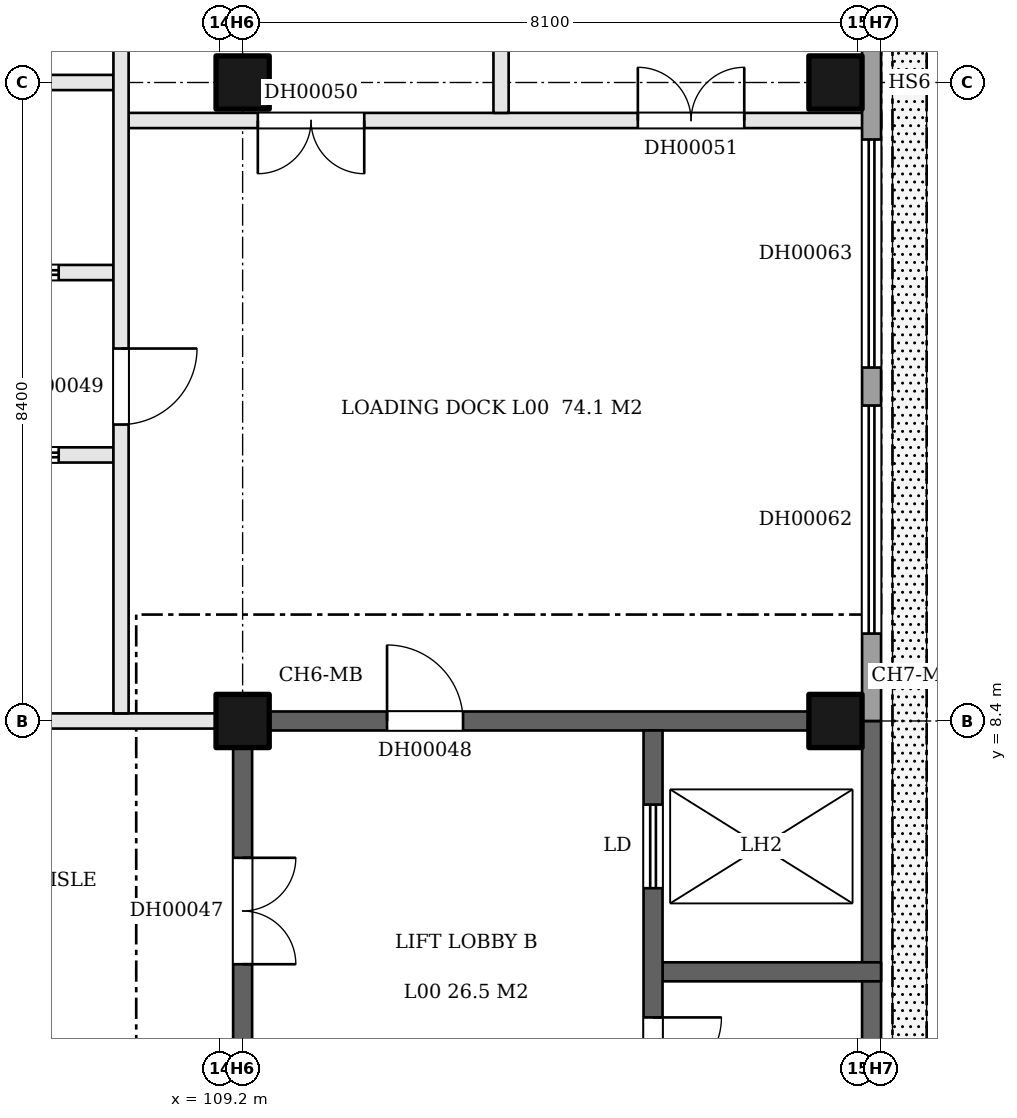
"""IFC4 building model, lengths in metres.
Left out: names, types, materials, properties, quantities, classifications, styles, units other than length and angle.
Written with IfcOpenShell. Run it as: python <this file> out.ifc"""

import sys

from ifc_helpers import new_model, si_unit, direction, frame, frame_2d, origin, origin_2d, place, context, subcontext, project, spatial, rectangle, extrude, element, fill, save


model = new_model("IFC4")
c1 = context("Model", 3, precision=1e-05, world=origin(), true_north=direction((0.0, 1.0)))
c2 = subcontext(c1, "Body", "Model", "MODEL_VIEW")
j1 = project(units=[si_unit("LENGTHUNIT", "METRE"), si_unit("PLANEANGLEUNIT", "RADIAN")], contexts=[c1])
p1 = place(None, origin())
s1 = spatial("IfcSite", under=j1, at=p1, CompositionType="ELEMENT")
p2 = place(p1, origin())
s2 = spatial("IfcBuilding", under=s1, at=p2, CompositionType="ELEMENT")
p3 = place(p2, origin())
s3 = spatial("IfcBuildingStorey", under=s2, at=p3, CompositionType="ELEMENT", Elevation=0.0)
p4 = place(p3, frame((109.5, 8.4, 0.0), z_axis=(0.0, 0.0, 1.0), x_axis=(1.0, 0.0, 0.0)))
e1 = element("IfcColumn", 1, at=p4, inside=s3, PredefinedType="COLUMN", context=c2, shape_type="SweptSolid", body=[
    extrude(rectangle(XDim=0.7, YDim=0.7, at=origin_2d()), origin(), (0.0, 0.0, 1.0), 8.7),
])
p5 = place(p3, frame((109.5, 16.8, -0.2), z_axis=(0.0, 0.0, 1.0), x_axis=(1.0, 0.0, 0.0)))
e2 = element("IfcColumn", 2, at=p5, inside=s3, PredefinedType="COLUMN", context=c2, shape_type="SweptSolid", body=[
    extrude(rectangle(XDim=0.7, YDim=0.7, at=origin_2d()), origin(), (0.0, 0.0, 1.0), 8.9),
])
p6 = place(p3, frame((117.3, 8.4, 0.0), z_axis=(0.0, 0.0, 1.0), x_axis=(1.0, 0.0, 0.0)))
e3 = element("IfcColumn", 3, at=p6, inside=s3, PredefinedType="COLUMN", context=c2, shape_type="SweptSolid", body=[
    extrude(rectangle(XDim=0.7, YDim=0.7, at=origin_2d()), origin(), (0.0, 0.0, 1.0), 8.7),
])
p7 = place(p3, frame((117.3, 16.8, -0.2), z_axis=(0.0, 0.0, 1.0), x_axis=(1.0, 0.0, 0.0)))
e4 = element("IfcColumn", 4, at=p7, inside=s3, PredefinedType="COLUMN", context=c2, shape_type="SweptSolid", body=[
    extrude(rectangle(XDim=0.7, YDim=0.7, at=origin_2d()), origin(), (0.0, 0.0, 1.0), 8.9),
])
p8 = place(p3, frame((115.025, 5.1, 0.0), z_axis=(0.0, 0.0, 1.0), x_axis=(1.0, 0.0, 0.0)))
e5 = element("IfcWall", 5, at=p8, inside=s3, PredefinedType="SHEAR", context=c2, shape_type="SweptSolid", body=[
    extrude(rectangle(XDim=2.875, YDim=0.25, at=frame_2d((1.438, 0.0))), origin(), (0.0, 0.0, 1.0), 8.7),
])
p9 = place(p3, frame((101.45, 8.4, 0.0), z_axis=(0.0, 0.0, 1.0), x_axis=(1.0, 0.0, 0.0)))
e6 = element("IfcWall", 6, at=p9, inside=s3, PredefinedType="PARTITIONING", context=c2, shape_type="SweptSolid", body=[
    extrude(rectangle(XDim=7.7, YDim=0.2, at=frame_2d((3.85, 0.0))), origin(), (0.0, 0.0, 1.0), 8.7),
])
p10 = place(p3, frame((109.85, 8.4, 0.0), z_axis=(0.0, 0.0, 1.0), x_axis=(1.0, 0.0, 0.0)))
e7 = element("IfcWall", 7, at=p10, inside=s3, PredefinedType="SHEAR", context=c2, shape_type="SweptSolid", body=[
    extrude(rectangle(XDim=7.1, YDim=0.25, at=frame_2d((3.55, 0.0))), origin(), (0.0, 0.0, 1.0), 8.7),
])
p11 = place(p10, frame((1.55, 0.0, 0.0)))
e8 = element("IfcOpeningElement", 8, at=p11, cuts=e7, PredefinedType="OPENING", context=c2, shape_type="SweptSolid", body=[
    extrude(rectangle(XDim=1.0, YDim=2.1, at=frame_2d((0.5, 1.05))), frame((0.0, 0.135, 0.0), z_axis=(0.0, -1.0, 0.0), x_axis=(1.0, 0.0, 0.0)), (0.0, 0.0, 1.0), 0.27),
])
p12 = place(p3, frame((68.35, 11.9, 0.0), z_axis=(0.0, 0.0, 1.0), x_axis=(1.0, 0.0, 0.0)))
e9 = element("IfcWall", 9, at=p12, inside=s3, PredefinedType="PARTITIONING", context=c2, shape_type="SweptSolid", body=[
    extrude(rectangle(XDim=39.45, YDim=0.2, at=frame_2d((19.725, 0.0))), origin(), (0.0, 0.0, 1.0), 8.7),
])
p13 = place(p12, frame((0.2, 0.0, 0.0)))
e10 = element("IfcOpeningElement", 10, at=p13, cuts=e9, PredefinedType="OPENING", context=c2, shape_type="SweptSolid", body=[
    extrude(rectangle(XDim=2.4, YDim=2.4, at=frame_2d((1.2, 1.2))), frame((0.0, 0.11, 0.0), z_axis=(0.0, -1.0, 0.0), x_axis=(1.0, 0.0, 0.0)), (0.0, 0.0, 1.0), 0.22),
])
p14 = place(p12, frame((4.01, 0.0, 0.0)))
e11 = element("IfcOpeningElement", 11, at=p14, cuts=e9, PredefinedType="OPENING", context=c2, shape_type="SweptSolid", body=[
    extrude(rectangle(XDim=2.4, YDim=2.4, at=frame_2d((1.2, 1.2))), frame((0.0, 0.11, 0.0), z_axis=(0.0, -1.0, 0.0), x_axis=(1.0, 0.0, 0.0)), (0.0, 0.0, 1.0), 0.22),
])
p15 = place(p12, frame((8.05, 0.0, 0.0)))
e12 = element("IfcOpeningElement", 12, at=p15, cuts=e9, PredefinedType="OPENING", context=c2, shape_type="SweptSolid", body=[
    extrude(rectangle(XDim=2.4, YDim=2.4, at=frame_2d((1.2, 1.2))), frame((0.0, 0.11, 0.0), z_axis=(0.0, -1.0, 0.0), x_axis=(1.0, 0.0, 0.0)), (0.0, 0.0, 1.0), 0.22),
])
p16 = place(p12, frame((12.09, 0.0, 0.0)))
e13 = element("IfcOpeningElement", 13, at=p16, cuts=e9, PredefinedType="OPENING", context=c2, shape_type="SweptSolid", body=[
    extrude(rectangle(XDim=2.4, YDim=2.4, at=frame_2d((1.2, 1.2))), frame((0.0, 0.11, 0.0), z_axis=(0.0, -1.0, 0.0), x_axis=(1.0, 0.0, 0.0)), (0.0, 0.0, 1.0), 0.22),
])
p17 = place(p12, frame((16.13, 0.0, 0.0)))
e14 = element("IfcOpeningElement", 14, at=p17, cuts=e9, PredefinedType="OPENING", context=c2, shape_type="SweptSolid", body=[
    extrude(rectangle(XDim=2.4, YDim=2.4, at=frame_2d((1.2, 1.2))), frame((0.0, 0.11, 0.0), z_axis=(0.0, -1.0, 0.0), x_axis=(1.0, 0.0, 0.0)), (0.0, 0.0, 1.0), 0.22),
])
p18 = place(p12, frame((20.17, 0.0, 0.0)))
e15 = element("IfcOpeningElement", 15, at=p18, cuts=e9, PredefinedType="OPENING", context=c2, shape_type="SweptSolid", body=[
    extrude(rectangle(XDim=2.4, YDim=2.4, at=frame_2d((1.2, 1.2))), frame((0.0, 0.11, 0.0), z_axis=(0.0, -1.0, 0.0), x_axis=(1.0, 0.0, 0.0)), (0.0, 0.0, 1.0), 0.22),
])
p19 = place(p12, frame((24.21, 0.0, 0.0)))
e16 = element("IfcOpeningElement", 16, at=p19, cuts=e9, PredefinedType="OPENING", context=c2, shape_type="SweptSolid", body=[
    extrude(rectangle(XDim=2.4, YDim=2.4, at=frame_2d((1.2, 1.2))), frame((0.0, 0.11, 0.0), z_axis=(0.0, -1.0, 0.0), x_axis=(1.0, 0.0, 0.0)), (0.0, 0.0, 1.0), 0.22),
])
p20 = place(p12, frame((28.25, 0.0, 0.0)))
e17 = element("IfcOpeningElement", 17, at=p20, cuts=e9, PredefinedType="OPENING", context=c2, shape_type="SweptSolid", body=[
    extrude(rectangle(XDim=2.4, YDim=2.4, at=frame_2d((1.2, 1.2))), frame((0.0, 0.11, 0.0), z_axis=(0.0, -1.0, 0.0), x_axis=(1.0, 0.0, 0.0)), (0.0, 0.0, 1.0), 0.22),
])
p21 = place(p12, frame((32.29, 0.0, 0.0)))
e18 = element("IfcOpeningElement", 18, at=p21, cuts=e9, PredefinedType="OPENING", context=c2, shape_type="SweptSolid", body=[
    extrude(rectangle(XDim=2.4, YDim=2.4, at=frame_2d((1.2, 1.2))), frame((0.0, 0.11, 0.0), z_axis=(0.0, -1.0, 0.0), x_axis=(1.0, 0.0, 0.0)), (0.0, 0.0, 1.0), 0.22),
])
p22 = place(p12, frame((36.33, 0.0, 0.0)))
e19 = element("IfcOpeningElement", 19, at=p22, cuts=e9, PredefinedType="OPENING", context=c2, shape_type="SweptSolid", body=[
    extrude(rectangle(XDim=2.4, YDim=2.4, at=frame_2d((1.2, 1.2))), frame((0.0, 0.11, 0.0), z_axis=(0.0, -1.0, 0.0), x_axis=(1.0, 0.0, 0.0)), (0.0, 0.0, 1.0), 0.22),
])
p23 = place(p3, frame((68.35, 14.3, 0.0), z_axis=(0.0, 0.0, 1.0), x_axis=(1.0, 0.0, 0.0)))
e20 = element("IfcWall", 20, at=p23, inside=s3, PredefinedType="PARTITIONING", context=c2, shape_type="SweptSolid", body=[
    extrude(rectangle(XDim=39.45, YDim=0.2, at=frame_2d((19.725, 0.0))), origin(), (0.0, 0.0, 1.0), 8.7),
])
p24 = place(p23, frame((0.2, 0.0, 0.0)))
e21 = element("IfcOpeningElement", 21, at=p24, cuts=e20, PredefinedType="OPENING", context=c2, shape_type="SweptSolid", body=[
    extrude(rectangle(XDim=2.4, YDim=2.4, at=frame_2d((1.2, 1.2))), frame((0.0, 0.11, 0.0), z_axis=(0.0, -1.0, 0.0), x_axis=(1.0, 0.0, 0.0)), (0.0, 0.0, 1.0), 0.22),
])
p25 = place(p23, frame((4.01, 0.0, 0.0)))
e22 = element("IfcOpeningElement", 22, at=p25, cuts=e20, PredefinedType="OPENING", context=c2, shape_type="SweptSolid", body=[
    extrude(rectangle(XDim=2.4, YDim=2.4, at=frame_2d((1.2, 1.2))), frame((0.0, 0.11, 0.0), z_axis=(0.0, -1.0, 0.0), x_axis=(1.0, 0.0, 0.0)), (0.0, 0.0, 1.0), 0.22),
])
p26 = place(p23, frame((8.05, 0.0, 0.0)))
e23 = element("IfcOpeningElement", 23, at=p26, cuts=e20, PredefinedType="OPENING", context=c2, shape_type="SweptSolid", body=[
    extrude(rectangle(XDim=2.4, YDim=2.4, at=frame_2d((1.2, 1.2))), frame((0.0, 0.11, 0.0), z_axis=(0.0, -1.0, 0.0), x_axis=(1.0, 0.0, 0.0)), (0.0, 0.0, 1.0), 0.22),
])
p27 = place(p23, frame((12.09, 0.0, 0.0)))
e24 = element("IfcOpeningElement", 24, at=p27, cuts=e20, PredefinedType="OPENING", context=c2, shape_type="SweptSolid", body=[
    extrude(rectangle(XDim=2.4, YDim=2.4, at=frame_2d((1.2, 1.2))), frame((0.0, 0.11, 0.0), z_axis=(0.0, -1.0, 0.0), x_axis=(1.0, 0.0, 0.0)), (0.0, 0.0, 1.0), 0.22),
])
p28 = place(p23, frame((16.13, 0.0, 0.0)))
e25 = element("IfcOpeningElement", 25, at=p28, cuts=e20, PredefinedType="OPENING", context=c2, shape_type="SweptSolid", body=[
    extrude(rectangle(XDim=2.4, YDim=2.4, at=frame_2d((1.2, 1.2))), frame((0.0, 0.11, 0.0), z_axis=(0.0, -1.0, 0.0), x_axis=(1.0, 0.0, 0.0)), (0.0, 0.0, 1.0), 0.22),
])
p29 = place(p23, frame((20.17, 0.0, 0.0)))
e26 = element("IfcOpeningElement", 26, at=p29, cuts=e20, PredefinedType="OPENING", context=c2, shape_type="SweptSolid", body=[
    extrude(rectangle(XDim=2.4, YDim=2.4, at=frame_2d((1.2, 1.2))), frame((0.0, 0.11, 0.0), z_axis=(0.0, -1.0, 0.0), x_axis=(1.0, 0.0, 0.0)), (0.0, 0.0, 1.0), 0.22),
])
p30 = place(p23, frame((24.21, 0.0, 0.0)))
e27 = element("IfcOpeningElement", 27, at=p30, cuts=e20, PredefinedType="OPENING", context=c2, shape_type="SweptSolid", body=[
    extrude(rectangle(XDim=2.4, YDim=2.4, at=frame_2d((1.2, 1.2))), frame((0.0, 0.11, 0.0), z_axis=(0.0, -1.0, 0.0), x_axis=(1.0, 0.0, 0.0)), (0.0, 0.0, 1.0), 0.22),
])
p31 = place(p23, frame((28.25, 0.0, 0.0)))
e28 = element("IfcOpeningElement", 28, at=p31, cuts=e20, PredefinedType="OPENING", context=c2, shape_type="SweptSolid", body=[
    extrude(rectangle(XDim=2.4, YDim=2.4, at=frame_2d((1.2, 1.2))), frame((0.0, 0.11, 0.0), z_axis=(0.0, -1.0, 0.0), x_axis=(1.0, 0.0, 0.0)), (0.0, 0.0, 1.0), 0.22),
])
p32 = place(p23, frame((32.29, 0.0, 0.0)))
e29 = element("IfcOpeningElement", 29, at=p32, cuts=e20, PredefinedType="OPENING", context=c2, shape_type="SweptSolid", body=[
    extrude(rectangle(XDim=2.4, YDim=2.4, at=frame_2d((1.2, 1.2))), frame((0.0, 0.11, 0.0), z_axis=(0.0, -1.0, 0.0), x_axis=(1.0, 0.0, 0.0)), (0.0, 0.0, 1.0), 0.22),
])
p33 = place(p23, frame((36.33, 0.0, 0.0)))
e30 = element("IfcOpeningElement", 30, at=p33, cuts=e20, PredefinedType="OPENING", context=c2, shape_type="SweptSolid", body=[
    extrude(rectangle(XDim=2.4, YDim=2.4, at=frame_2d((1.2, 1.2))), frame((0.0, 0.11, 0.0), z_axis=(0.0, -1.0, 0.0), x_axis=(1.0, 0.0, 0.0)), (0.0, 0.0, 1.0), 0.22),
])
p34 = place(p3, frame((108.0, 16.3, 0.0), z_axis=(0.0, 0.0, 1.0), x_axis=(1.0, 0.0, 0.0)))
e31 = element("IfcWall", 31, at=p34, inside=s3, PredefinedType="PARTITIONING", context=c2, shape_type="SweptSolid", body=[
    extrude(rectangle(XDim=9.9, YDim=0.2, at=frame_2d((4.95, 0.0))), origin(), (0.0, 0.0, 1.0), 8.7),
])
p35 = place(p34, frame((1.7, 0.0, 0.0)))
e32 = element("IfcOpeningElement", 32, at=p35, cuts=e31, PredefinedType="OPENING", context=c2, shape_type="SweptSolid", body=[
    extrude(rectangle(XDim=1.4, YDim=2.1, at=frame_2d((0.7, 1.05))), frame((0.0, 0.11, 0.0), z_axis=(0.0, -1.0, 0.0), x_axis=(1.0, 0.0, 0.0)), (0.0, 0.0, 1.0), 0.22),
])
p36 = place(p34, frame((6.7, 0.0, 0.0)))
e33 = element("IfcOpeningElement", 33, at=p36, cuts=e31, PredefinedType="OPENING", context=c2, shape_type="SweptSolid", body=[
    extrude(rectangle(XDim=1.4, YDim=2.1, at=frame_2d((0.7, 1.05))), frame((0.0, 0.11, 0.0), z_axis=(0.0, -1.0, 0.0), x_axis=(1.0, 0.0, 0.0)), (0.0, 0.0, 1.0), 0.22),
])
p37 = place(p3, frame((101.45, 16.8, 0.0), z_axis=(0.0, 0.0, 1.0), x_axis=(1.0, 0.0, 0.0)))
e34 = element("IfcWall", 34, at=p37, inside=s3, PredefinedType="PARTITIONING", context=c2, shape_type="SweptSolid", body=[
    extrude(rectangle(XDim=6.35, YDim=0.2, at=frame_2d((3.175, 0.0))), origin(), (0.0, 0.0, 1.0), 8.7),
])
p38 = place(p3, frame((107.9, 8.5, 0.0), z_axis=(0.0, 0.0, 1.0), x_axis=(0.0, 1.0, 0.0)))
e35 = element("IfcWall", 35, at=p38, inside=s3, PredefinedType="PARTITIONING", context=c2, shape_type="SweptSolid", body=[
    extrude(rectangle(XDim=25.1, YDim=0.2, at=frame_2d((12.55, 0.0))), origin(), (0.0, 0.0, 1.0), 8.7),
])
p39 = place(p38, frame((3.8, 0.0, 0.0)))
e36 = element("IfcOpeningElement", 36, at=p39, cuts=e35, PredefinedType="OPENING", context=c2, shape_type="SweptSolid", body=[
    extrude(rectangle(XDim=1.0, YDim=2.1, at=frame_2d((0.5, 1.05))), frame((0.0, 0.11, 0.0), z_axis=(0.0, -1.0, 0.0), x_axis=(1.0, 0.0, 0.0)), (0.0, 0.0, 1.0), 0.22),
])
p40 = place(p38, frame((10.0, 0.0, 0.0)))
e37 = element("IfcOpeningElement", 37, at=p40, cuts=e35, PredefinedType="OPENING", context=c2, shape_type="SweptSolid", body=[
    extrude(rectangle(XDim=1.0, YDim=2.1, at=frame_2d((0.5, 1.05))), frame((0.0, 0.11, 0.0), z_axis=(0.0, -1.0, 0.0), x_axis=(1.0, 0.0, 0.0)), (0.0, 0.0, 1.0), 0.22),
])
p41 = place(p38, frame((22.5, 0.0, 0.0)))
e38 = element("IfcOpeningElement", 38, at=p41, cuts=e35, PredefinedType="OPENING", context=c2, shape_type="SweptSolid", body=[
    extrude(rectangle(XDim=1.0, YDim=2.1, at=frame_2d((0.5, 1.05))), frame((0.0, 0.11, 0.0), z_axis=(0.0, -1.0, 0.0), x_axis=(1.0, 0.0, 0.0)), (0.0, 0.0, 1.0), 0.22),
])
p42 = place(p3, frame((109.5, 0.95, 0.0), z_axis=(0.0, 0.0, 1.0), x_axis=(0.0, 1.0, 0.0)))
e39 = element("IfcWall", 39, at=p42, inside=s3, PredefinedType="SHEAR", context=c2, shape_type="SweptSolid", body=[
    extrude(rectangle(XDim=7.1, YDim=0.25, at=frame_2d((3.55, 0.0))), origin(), (0.0, 0.0, 1.0), 8.7),
])
p43 = place(p42, frame((4.25, 0.0, 0.0)))
e40 = element("IfcOpeningElement", 40, at=p43, cuts=e39, PredefinedType="OPENING", context=c2, shape_type="SweptSolid", body=[
    extrude(rectangle(XDim=1.4, YDim=2.1, at=frame_2d((0.7, 1.05))), frame((0.0, 0.135, 0.0), z_axis=(0.0, -1.0, 0.0), x_axis=(1.0, 0.0, 0.0)), (0.0, 0.0, 1.0), 0.27),
])
p44 = place(p3, frame((112.9, 16.4, 0.0), z_axis=(0.0, 0.0, 1.0), x_axis=(0.0, 1.0, 0.0)))
e41 = element("IfcWall", 41, at=p44, inside=s3, PredefinedType="PARTITIONING", context=c2, shape_type="SweptSolid", body=[
    extrude(rectangle(XDim=8.7, YDim=0.2, at=frame_2d((4.35, 0.0))), origin(), (0.0, 0.0, 1.0), 8.7),
])
p45 = place(p3, frame((114.9, 3.125, 0.0), z_axis=(0.0, 0.0, 1.0), x_axis=(0.0, 1.0, 0.0)))
e42 = element("IfcWall", 42, at=p45, inside=s3, PredefinedType="SHEAR", context=c2, shape_type="SweptSolid", body=[
    extrude(rectangle(XDim=5.15, YDim=0.25, at=frame_2d((2.575, 0.0))), origin(), (0.0, 0.0, 1.0), 8.7),
])
p46 = place(p45, frame((3.075, 0.0, 0.0)))
e43 = element("IfcOpeningElement", 43, at=p46, cuts=e42, PredefinedType="OPENING", context=c2, shape_type="SweptSolid", body=[
    extrude(rectangle(XDim=1.1, YDim=2.1, at=frame_2d((0.55, 1.05))), frame((0.0, 0.135, 0.0), z_axis=(0.0, -1.0, 0.0), x_axis=(1.0, 0.0, 0.0)), (0.0, 0.0, 1.0), 0.27),
])
p47 = place(p45, frame((0.475, 0.0, 0.0)))
e44 = element("IfcOpeningElement", 44, at=p47, cuts=e42, PredefinedType="OPENING", context=c2, shape_type="SweptSolid", body=[
    extrude(rectangle(XDim=0.9, YDim=2.1, at=frame_2d((0.45, 1.05))), frame((0.0, 0.135, 0.0), z_axis=(0.0, -1.0, 0.0), x_axis=(1.0, 0.0, 0.0)), (0.0, 0.0, 1.0), 0.27),
])
p48 = place(p3, frame((117.775, 0.0, 0.0), z_axis=(0.0, 0.0, 1.0), x_axis=(0.0, 1.0, 0.0)))
e45 = element("IfcWall", 45, at=p48, inside=s3, PredefinedType="SHEAR", context=c2, shape_type="SweptSolid", body=[
    extrude(rectangle(XDim=8.4, YDim=0.25, at=frame_2d((4.2, 0.0))), origin(), (0.0, 0.0, 1.0), 8.7),
])
p49 = place(p3, frame((117.775, 8.4, 0.0), z_axis=(0.0, 0.0, 1.0), x_axis=(0.0, 1.0, 0.0)))
e46 = element("IfcWall", 46, at=p49, inside=s3, PredefinedType="SOLIDWALL", context=c2, shape_type="SweptSolid", body=[
    extrude(rectangle(XDim=16.8, YDim=0.25, at=frame_2d((8.4, 0.0))), origin(), (0.0, 0.0, 1.0), 8.7),
])
p50 = place(p49, frame((1.15, 0.0, 0.0)))
e47 = element("IfcOpeningElement", 47, at=p50, cuts=e46, PredefinedType="OPENING", context=c2, shape_type="SweptSolid", body=[
    extrude(rectangle(XDim=3.0, YDim=4.5, at=frame_2d((1.5, 2.25))), frame((0.0, 0.135, 0.0), z_axis=(0.0, -1.0, 0.0), x_axis=(1.0, 0.0, 0.0)), (0.0, 0.0, 1.0), 0.27),
])
p51 = place(p49, frame((4.65, 0.0, 0.0)))
e48 = element("IfcOpeningElement", 48, at=p51, cuts=e46, PredefinedType="OPENING", context=c2, shape_type="SweptSolid", body=[
    extrude(rectangle(XDim=3.0, YDim=4.5, at=frame_2d((1.5, 2.25))), frame((0.0, 0.135, 0.0), z_axis=(0.0, -1.0, 0.0), x_axis=(1.0, 0.0, 0.0)), (0.0, 0.0, 1.0), 0.27),
])
p52 = place(p22, origin())
e49 = element("IfcDoor", 49, at=p52, inside=s3, OperationType="ROLLINGUP", PredefinedType="DOOR", context=c2, shape_type="SweptSolid", body=[
    extrude(rectangle(XDim=2.4, YDim=2.4, at=frame_2d((1.2, 1.2))), frame((0.0, 0.025, 0.0), z_axis=(0.0, -1.0, 0.0), x_axis=(1.0, 0.0, 0.0)), (0.0, 0.0, 1.0), 0.05),
])
fill(e19, e49)
p53 = place(p33, origin())
e50 = element("IfcDoor", 50, at=p53, inside=s3, OperationType="ROLLINGUP", PredefinedType="DOOR", context=c2, shape_type="SweptSolid", body=[
    extrude(rectangle(XDim=2.4, YDim=2.4, at=frame_2d((1.2, 1.2))), frame((0.0, 0.025, 0.0), z_axis=(0.0, -1.0, 0.0), x_axis=(1.0, 0.0, 0.0)), (0.0, 0.0, 1.0), 0.05),
])
fill(e30, e50)
p54 = place(p43, frame((1.4, 0.0, 0.0), z_axis=(0.0, 0.0, 1.0), x_axis=(-1.0, 0.0, 0.0)))
e51 = element("IfcDoor", 51, at=p54, inside=s3, OperationType="DOUBLE_DOOR_SINGLE_SWING", PredefinedType="DOOR", context=c2, shape_type="SweptSolid", body=[
    extrude(rectangle(XDim=1.4, YDim=2.1, at=frame_2d((0.7, 1.05))), frame((0.0, 0.025, 0.0), z_axis=(0.0, -1.0, 0.0), x_axis=(1.0, 0.0, 0.0)), (0.0, 0.0, 1.0), 0.05),
])
fill(e40, e51)
p55 = place(p11, origin())
e52 = element("IfcDoor", 52, at=p55, inside=s3, OperationType="SINGLE_SWING_LEFT", PredefinedType="DOOR", context=c2, shape_type="SweptSolid", body=[
    extrude(rectangle(XDim=1.0, YDim=2.1, at=frame_2d((0.5, 1.05))), frame((0.0, 0.025, 0.0), z_axis=(0.0, -1.0, 0.0), x_axis=(1.0, 0.0, 0.0)), (0.0, 0.0, 1.0), 0.05),
])
fill(e8, e52)
p56 = place(p39, frame((1.0, 0.0, 0.0), z_axis=(0.0, 0.0, 1.0), x_axis=(-1.0, 0.0, 0.0)))
e53 = element("IfcDoor", 53, at=p56, inside=s3, OperationType="SINGLE_SWING_LEFT", PredefinedType="DOOR", context=c2, shape_type="SweptSolid", body=[
    extrude(rectangle(XDim=1.0, YDim=2.1, at=frame_2d((0.5, 1.05))), frame((0.0, 0.025, 0.0), z_axis=(0.0, -1.0, 0.0), x_axis=(1.0, 0.0, 0.0)), (0.0, 0.0, 1.0), 0.05),
])
fill(e36, e53)
p57 = place(p35, frame((1.4, 0.0, 0.0), z_axis=(0.0, 0.0, 1.0), x_axis=(-1.0, 0.0, 0.0)))
e54 = element("IfcDoor", 54, at=p57, inside=s3, OperationType="DOUBLE_DOOR_SINGLE_SWING", PredefinedType="DOOR", context=c2, shape_type="SweptSolid", body=[
    extrude(rectangle(XDim=1.4, YDim=2.1, at=frame_2d((0.7, 1.05))), frame((0.0, 0.025, 0.0), z_axis=(0.0, -1.0, 0.0), x_axis=(1.0, 0.0, 0.0)), (0.0, 0.0, 1.0), 0.05),
])
fill(e32, e54)
p58 = place(p36, origin())
e55 = element("IfcDoor", 55, at=p58, inside=s3, OperationType="DOUBLE_DOOR_SINGLE_SWING", PredefinedType="DOOR", context=c2, shape_type="SweptSolid", body=[
    extrude(rectangle(XDim=1.4, YDim=2.1, at=frame_2d((0.7, 1.05))), frame((0.0, 0.025, 0.0), z_axis=(0.0, -1.0, 0.0), x_axis=(1.0, 0.0, 0.0)), (0.0, 0.0, 1.0), 0.05),
])
fill(e33, e55)
p59 = place(p50, frame((3.0, 0.0, 0.0), z_axis=(0.0, 0.0, 1.0), x_axis=(-1.0, 0.0, 0.0)))
e56 = element("IfcDoor", 56, at=p59, inside=s3, OperationType="ROLLINGUP", PredefinedType="DOOR", context=c2, shape_type="SweptSolid", body=[
    extrude(rectangle(XDim=3.0, YDim=4.5, at=frame_2d((1.5, 2.25))), frame((0.0, 0.025, 0.0), z_axis=(0.0, -1.0, 0.0), x_axis=(1.0, 0.0, 0.0)), (0.0, 0.0, 1.0), 0.05),
])
fill(e47, e56)
p60 = place(p51, frame((3.0, 0.0, 0.0), z_axis=(0.0, 0.0, 1.0), x_axis=(-1.0, 0.0, 0.0)))
e57 = element("IfcDoor", 57, at=p60, inside=s3, OperationType="ROLLINGUP", PredefinedType="DOOR", context=c2, shape_type="SweptSolid", body=[
    extrude(rectangle(XDim=3.0, YDim=4.5, at=frame_2d((1.5, 2.25))), frame((0.0, 0.025, 0.0), z_axis=(0.0, -1.0, 0.0), x_axis=(1.0, 0.0, 0.0)), (0.0, 0.0, 1.0), 0.05),
])
fill(e48, e57)
p61 = place(p46, origin())
e58 = element("IfcDoor", 58, at=p61, inside=s3, OperationType="SLIDING_TO_LEFT", PredefinedType="DOOR", context=c2, shape_type="SweptSolid", body=[
    extrude(rectangle(XDim=1.1, YDim=2.1, at=frame_2d((0.55, 1.05))), frame((0.0, 0.025, 0.0), z_axis=(0.0, -1.0, 0.0), x_axis=(1.0, 0.0, 0.0)), (0.0, 0.0, 1.0), 0.05),
])
fill(e43, e58)
p62 = place(p47, frame((0.9, 0.0, 0.0), z_axis=(0.0, 0.0, 1.0), x_axis=(-1.0, 0.0, 0.0)))
e59 = element("IfcDoor", 59, at=p62, inside=s3, OperationType="SINGLE_SWING_LEFT", PredefinedType="DOOR", context=c2, shape_type="SweptSolid", body=[
    extrude(rectangle(XDim=0.9, YDim=2.1, at=frame_2d((0.45, 1.05))), frame((0.0, 0.025, 0.0), z_axis=(0.0, -1.0, 0.0), x_axis=(1.0, 0.0, 0.0)), (0.0, 0.0, 1.0), 0.05),
])
fill(e44, e59)
save(model, sys.argv[1])
